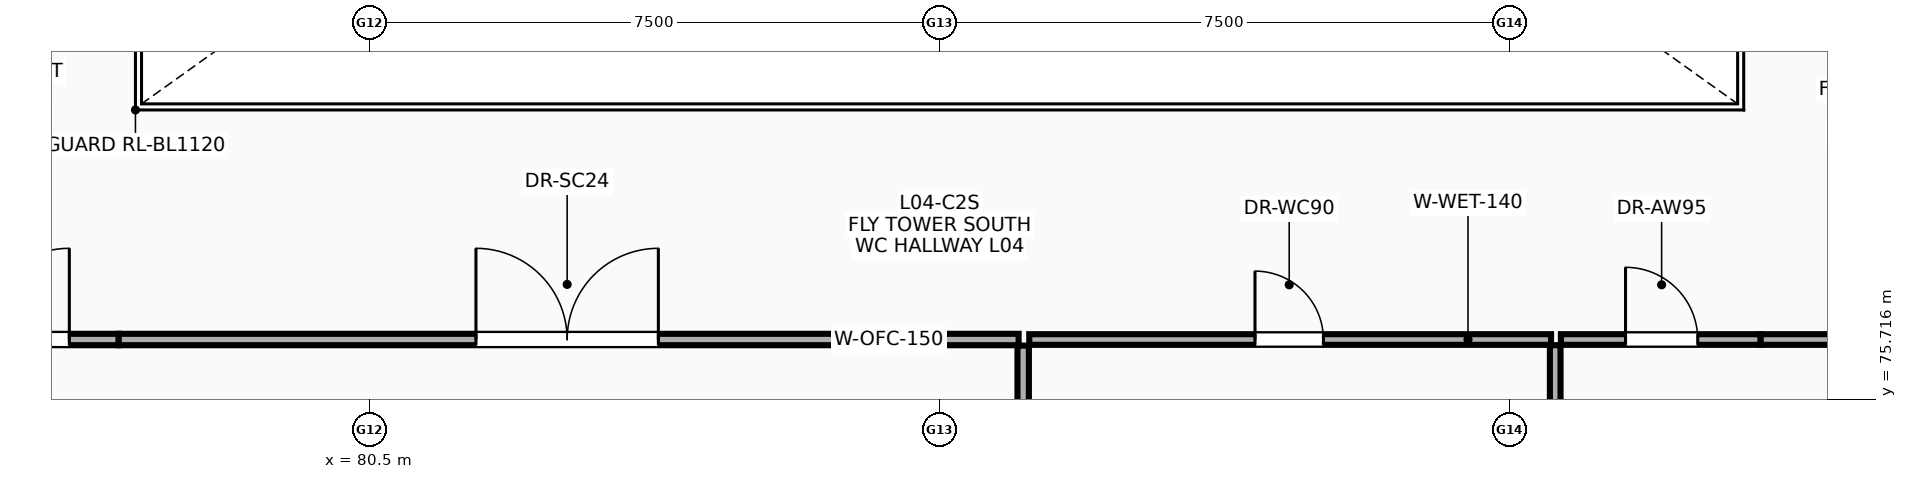
"""IFC4 building model, lengths in metres.
Left out: names, types, materials, properties, quantities, classifications, styles, units other than length and angle.
Written with IfcOpenShell. Run it as: python <this file> out.ifc"""

import sys

from ifc_helpers import new_model, si_unit, direction, frame, frame_2d, origin, place, context, subcontext, project, spatial, rectangle, extrude, element, fill, save


model = new_model("IFC4")
c1 = context("Model", 3, precision=1e-05, world=origin(), true_north=direction((0.0, 1.0)))
c2 = subcontext(c1, "Body", "Model", "MODEL_VIEW")
j1 = project(units=[si_unit("LENGTHUNIT", "METRE"), si_unit("PLANEANGLEUNIT", "RADIAN")], contexts=[c1])
p1 = place(None, origin())
s1 = spatial("IfcSite", under=j1, at=p1, CompositionType="ELEMENT")
p2 = place(p1, origin())
s2 = spatial("IfcBuilding", under=s1, at=p2, CompositionType="ELEMENT")
p3 = place(p2, frame((0.0, 0.0, 18.0)))
s3 = spatial("IfcBuildingStorey", under=s2, at=p3, CompositionType="ELEMENT", Elevation=18.0)
p4 = place(p3, frame((89.1, 72.78, 0.0), z_axis=(0.0, 0.0, 1.0), x_axis=(0.0, 1.0, 0.0)))
e1 = element("IfcWall", 1, at=p4, inside=s3, PredefinedType="PARTITIONING", context=c2, shape_type="SweptSolid", body=[
    extrude(rectangle(XDim=3.64, YDim=0.15, at=frame_2d((1.82, 0.0))), origin(), (0.0, 0.0, 1.0), 5.1),
])
p5 = place(p3, frame((73.18, 76.5, 0.0), z_axis=(0.0, 0.0, 1.0), x_axis=(1.0, 0.0, 0.0)))
e2 = element("IfcWall", 2, at=p5, inside=s3, PredefinedType="PARTITIONING", context=c2, shape_type="SweptSolid", body=[
    extrude(rectangle(XDim=4.02, YDim=0.15, at=frame_2d((2.01, 0.0))), origin(), (0.0, 0.0, 1.0), 5.1),
])
p6 = place(p5, frame((0.97, 0.0, 0.0)))
e3 = element("IfcOpeningElement", 3, at=p6, cuts=e2, PredefinedType="OPENING", context=c2, shape_type="SweptSolid", body=[
    extrude(rectangle(XDim=2.4, YDim=2.6, at=frame_2d((1.2, 1.3))), frame((0.0, 0.085, 0.0), z_axis=(0.0, -1.0, 0.0), x_axis=(1.0, 0.0, 0.0)), (0.0, 0.0, 1.0), 0.17),
])
p7 = place(p3, frame((77.2, 76.5, 0.0), z_axis=(0.0, 0.0, 1.0), x_axis=(1.0, 0.0, 0.0)))
e4 = element("IfcWall", 4, at=p7, inside=s3, PredefinedType="PARTITIONING", context=c2, shape_type="SweptSolid", body=[
    extrude(rectangle(XDim=11.84, YDim=0.15, at=frame_2d((5.92, 0.0))), origin(), (0.0, 0.0, 1.0), 5.1),
])
p8 = place(p7, frame((4.7, 0.0, 0.0)))
e5 = element("IfcOpeningElement", 5, at=p8, cuts=e4, PredefinedType="OPENING", context=c2, shape_type="SweptSolid", body=[
    extrude(rectangle(XDim=2.4, YDim=2.6, at=frame_2d((1.2, 1.3))), frame((0.0, 0.085, 0.0), z_axis=(0.0, -1.0, 0.0), x_axis=(1.0, 0.0, 0.0)), (0.0, 0.0, 1.0), 0.17),
])
p9 = place(p3, frame((96.1, 72.78, 0.0), z_axis=(0.0, 0.0, 1.0), x_axis=(0.0, 1.0, 0.0)))
e6 = element("IfcWall", 6, at=p9, inside=s3, PredefinedType="PARTITIONING", context=c2, shape_type="SweptSolid", body=[
    extrude(rectangle(XDim=3.645, YDim=0.14, at=frame_2d((1.823, 0.0))), origin(), (0.0, 0.0, 1.0), 5.1),
])
p10 = place(p3, frame((89.18, 76.5, 0.0), z_axis=(0.0, 0.0, 1.0), x_axis=(1.0, 0.0, 0.0)))
e7 = element("IfcWall", 7, at=p10, inside=s3, PredefinedType="PARTITIONING", context=c2, shape_type="SweptSolid", body=[
    extrude(rectangle(XDim=6.865, YDim=0.14, at=frame_2d((3.433, 0.0))), origin(), (0.0, 0.0, 1.0), 5.1),
])
p11 = place(p10, frame((2.97, 0.0, 0.0)))
e8 = element("IfcOpeningElement", 8, at=p11, cuts=e7, PredefinedType="OPENING", context=c2, shape_type="SweptSolid", body=[
    extrude(rectangle(XDim=0.9, YDim=2.1, at=frame_2d((0.45, 1.05))), frame((0.0, 0.08, 0.0), z_axis=(0.0, -1.0, 0.0), x_axis=(1.0, 0.0, 0.0)), (0.0, 0.0, 1.0), 0.16),
])
p12 = place(p3, frame((98.8, 76.5, 0.0), z_axis=(0.0, 0.0, 1.0), x_axis=(1.0, 0.0, 0.0)))
e9 = element("IfcWall", 9, at=p12, inside=s3, PredefinedType="PARTITIONING", context=c2, shape_type="SweptSolid", body=[
    extrude(rectangle(XDim=4.02, YDim=0.14, at=frame_2d((2.01, 0.0))), origin(), (0.0, 0.0, 1.0), 5.1),
])
p13 = place(p12, frame((1.375, 0.0, 0.0)))
e10 = element("IfcOpeningElement", 10, at=p13, cuts=e9, PredefinedType="OPENING", context=c2, shape_type="SweptSolid", body=[
    extrude(rectangle(XDim=0.95, YDim=2.1, at=frame_2d((0.475, 1.05))), frame((0.0, 0.08, 0.0), z_axis=(0.0, -1.0, 0.0), x_axis=(1.0, 0.0, 0.0)), (0.0, 0.0, 1.0), 0.16),
])
p14 = place(p3, frame((96.175, 76.5, 0.0), z_axis=(0.0, 0.0, 1.0), x_axis=(1.0, 0.0, 0.0)))
e11 = element("IfcWall", 11, at=p14, inside=s3, PredefinedType="PARTITIONING", context=c2, shape_type="SweptSolid", body=[
    extrude(rectangle(XDim=2.625, YDim=0.14, at=frame_2d((1.312, 0.0))), origin(), (0.0, 0.0, 1.0), 5.1),
])
p15 = place(p14, frame((0.85, 0.0, 0.0)))
e12 = element("IfcOpeningElement", 12, at=p15, cuts=e11, PredefinedType="OPENING", context=c2, shape_type="SweptSolid", body=[
    extrude(rectangle(XDim=0.95, YDim=2.1, at=frame_2d((0.475, 1.05))), frame((0.0, 0.08, 0.0), z_axis=(0.0, -1.0, 0.0), x_axis=(1.0, 0.0, 0.0)), (0.0, 0.0, 1.0), 0.16),
])
p16 = place(p6, origin())
e13 = element("IfcDoor", 13, at=p16, inside=s3, OperationType="DOUBLE_DOOR_SINGLE_SWING", PredefinedType="DOOR", context=c2, shape_type="SweptSolid", body=[
    extrude(rectangle(XDim=2.4, YDim=2.6, at=frame_2d((1.2, 1.3))), frame((0.0, 0.025, 0.0), z_axis=(0.0, -1.0, 0.0), x_axis=(1.0, 0.0, 0.0)), (0.0, 0.0, 1.0), 0.05),
])
fill(e3, e13)
p17 = place(p8, origin())
e14 = element("IfcDoor", 14, at=p17, inside=s3, OperationType="DOUBLE_DOOR_SINGLE_SWING", PredefinedType="DOOR", context=c2, shape_type="SweptSolid", body=[
    extrude(rectangle(XDim=2.4, YDim=2.6, at=frame_2d((1.2, 1.3))), frame((0.0, 0.025, 0.0), z_axis=(0.0, -1.0, 0.0), x_axis=(1.0, 0.0, 0.0)), (0.0, 0.0, 1.0), 0.05),
])
fill(e5, e14)
p18 = place(p11, origin())
e15 = element("IfcDoor", 15, at=p18, inside=s3, OperationType="SINGLE_SWING_LEFT", PredefinedType="DOOR", context=c2, shape_type="SweptSolid", body=[
    extrude(rectangle(XDim=0.9, YDim=2.1, at=frame_2d((0.45, 1.05))), frame((0.0, 0.025, 0.0), z_axis=(0.0, -1.0, 0.0), x_axis=(1.0, 0.0, 0.0)), (0.0, 0.0, 1.0), 0.05),
])
fill(e8, e15)
p19 = place(p15, origin())
e16 = element("IfcDoor", 16, at=p19, inside=s3, OperationType="SINGLE_SWING_LEFT", PredefinedType="DOOR", context=c2, shape_type="SweptSolid", body=[
    extrude(rectangle(XDim=0.95, YDim=2.1, at=frame_2d((0.475, 1.05))), frame((0.0, 0.025, 0.0), z_axis=(0.0, -1.0, 0.0), x_axis=(1.0, 0.0, 0.0)), (0.0, 0.0, 1.0), 0.05),
])
fill(e12, e16)
save(model, sys.argv[1])
